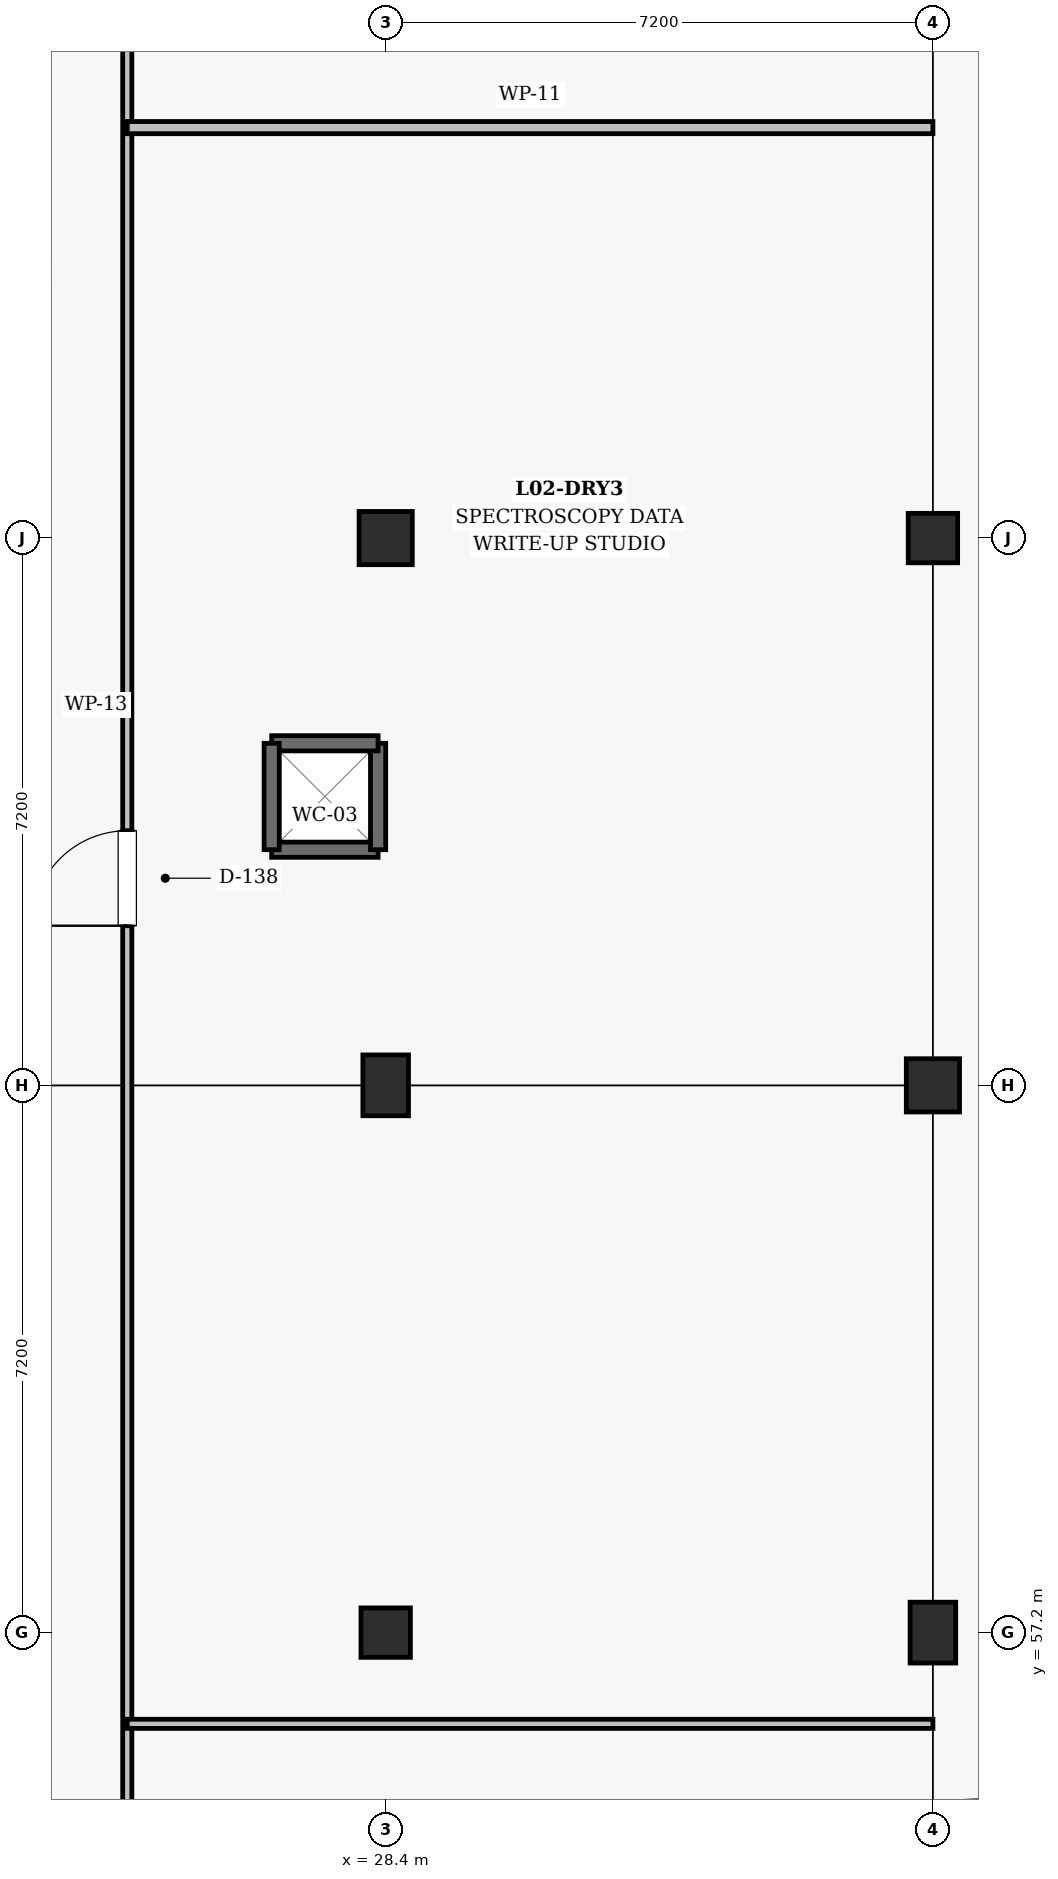
"""IFC4 building model, lengths in metres.
Left out: names, types, materials, properties, quantities, classifications, styles, units other than length and angle.
Written with IfcOpenShell. Run it as: python <this file> out.ifc"""

import sys

from ifc_helpers import new_model, si_unit, direction, frame, frame_2d, origin, origin_2d, place, context, subcontext, project, spatial, rectangle, extrude, element, fill, save


model = new_model("IFC4")
c1 = context("Model", 3, precision=1e-05, world=origin(), true_north=direction((0.0, 1.0)))
c2 = subcontext(c1, "Body", "Model", "MODEL_VIEW")
j1 = project(units=[si_unit("LENGTHUNIT", "METRE"), si_unit("PLANEANGLEUNIT", "RADIAN")], contexts=[c1])
p1 = place(None, origin())
s1 = spatial("IfcSite", under=j1, at=p1, CompositionType="ELEMENT")
p2 = place(p1, origin())
s2 = spatial("IfcBuilding", under=s1, at=p2, CompositionType="ELEMENT")
p3 = place(p2, frame((0.0, 0.0, 9.9)))
s3 = spatial("IfcBuildingStorey", under=s2, at=p3, CompositionType="ELEMENT", Elevation=9.9)
p4 = place(p3, frame((28.4, 57.2, 0.0), z_axis=(0.0, 0.0, 1.0), x_axis=(1.0, 0.0, 0.0)))
e1 = element("IfcColumn", 1, at=p4, inside=s3, PredefinedType="COLUMN", context=c2, shape_type="SweptSolid", body=[
    extrude(rectangle(XDim=0.65, YDim=0.65, at=origin_2d()), origin(), (0.0, 0.0, 1.0), 4.5),
])
p5 = place(p3, frame((28.4, 64.4, 0.0), z_axis=(0.0, 0.0, 1.0), x_axis=(1.0, 0.0, 0.0)))
e2 = element("IfcColumn", 2, at=p5, inside=s3, PredefinedType="COLUMN", context=c2, shape_type="SweptSolid", body=[
    extrude(rectangle(XDim=0.6, YDim=0.8, at=origin_2d()), origin(), (0.0, 0.0, 1.0), 4.5),
])
p6 = place(p3, frame((28.4, 71.6, 0.0), z_axis=(0.0, 0.0, 1.0), x_axis=(1.0, 0.0, 0.0)))
e3 = element("IfcColumn", 3, at=p6, inside=s3, PredefinedType="COLUMN", context=c2, shape_type="SweptSolid", body=[
    extrude(rectangle(XDim=0.7, YDim=0.7, at=origin_2d()), origin(), (0.0, 0.0, 1.0), 4.5),
])
p7 = place(p3, frame((35.6, 57.2, 0.0), z_axis=(0.0, 0.0, 1.0), x_axis=(1.0, 0.0, 0.0)))
e4 = element("IfcColumn", 4, at=p7, inside=s3, PredefinedType="COLUMN", context=c2, shape_type="SweptSolid", body=[
    extrude(rectangle(XDim=0.6, YDim=0.8, at=origin_2d()), origin(), (0.0, 0.0, 1.0), 4.5),
])
p8 = place(p3, frame((35.6, 64.4, 0.0), z_axis=(0.0, 0.0, 1.0), x_axis=(1.0, 0.0, 0.0)))
e5 = element("IfcColumn", 5, at=p8, inside=s3, PredefinedType="COLUMN", context=c2, shape_type="SweptSolid", body=[
    extrude(rectangle(XDim=0.7, YDim=0.7, at=origin_2d()), origin(), (0.0, 0.0, 1.0), 4.5),
])
p9 = place(p3, frame((35.6, 71.6, 0.0), z_axis=(0.0, 0.0, 1.0), x_axis=(1.0, 0.0, 0.0)))
e6 = element("IfcColumn", 6, at=p9, inside=s3, PredefinedType="COLUMN", context=c2, shape_type="SweptSolid", body=[
    extrude(rectangle(XDim=0.65, YDim=0.65, at=origin_2d()), origin(), (0.0, 0.0, 1.0), 4.5),
])
p10 = place(p3, frame((26.9, 67.5, 0.0), z_axis=(0.0, 0.0, 1.0), x_axis=(1.0, 0.0, 0.0)))
e7 = element("IfcWall", 7, at=p10, inside=s3, PredefinedType="SHEAR", context=c2, shape_type="SweptSolid", body=[
    extrude(rectangle(XDim=1.4, YDim=0.2, at=frame_2d((0.7, 0.0))), origin(), (0.0, 0.0, 1.0), 4.16),
])
p11 = place(p3, frame((28.3, 67.5, 0.0), z_axis=(0.0, 0.0, 1.0), x_axis=(0.0, 1.0, 0.0)))
e8 = element("IfcWall", 8, at=p11, inside=s3, PredefinedType="SHEAR", context=c2, shape_type="SweptSolid", body=[
    extrude(rectangle(XDim=1.4, YDim=0.2, at=frame_2d((0.7, 0.0))), origin(), (0.0, 0.0, 1.0), 4.16),
])
p12 = place(p3, frame((28.3, 68.9, 0.0), z_axis=(0.0, 0.0, 1.0), x_axis=(-1.0, 0.0, 0.0)))
e9 = element("IfcWall", 9, at=p12, inside=s3, PredefinedType="SHEAR", context=c2, shape_type="SweptSolid", body=[
    extrude(rectangle(XDim=1.4, YDim=0.2, at=frame_2d((0.7, 0.0))), origin(), (0.0, 0.0, 1.0), 4.16),
])
p13 = place(p3, frame((26.9, 68.9, 0.0), z_axis=(0.0, 0.0, 1.0), x_axis=(0.0, -1.0, 0.0)))
e10 = element("IfcWall", 10, at=p13, inside=s3, PredefinedType="SHEAR", context=c2, shape_type="SweptSolid", body=[
    extrude(rectangle(XDim=1.4, YDim=0.2, at=frame_2d((0.7, 0.0))), origin(), (0.0, 0.0, 1.0), 4.16),
])
p14 = place(p3, frame((25.0, 36.0, 0.0), z_axis=(0.0, 0.0, 1.0), x_axis=(0.0, 1.0, 0.0)))
e11 = element("IfcWall", 11, at=p14, inside=s3, PredefinedType="PARTITIONING", context=c2, shape_type="SweptSolid", body=[
    extrude(rectangle(XDim=66.8, YDim=0.12, at=frame_2d((33.4, 0.0))), origin(), (0.0, 0.0, 1.0), 3.38),
])
p15 = place(p14, frame((10.0, 0.0, 0.0)))
e12 = element("IfcOpeningElement", 12, at=p15, cuts=e11, PredefinedType="OPENING", context=c2, shape_type="SweptSolid", body=[
    extrude(rectangle(XDim=1.18, YDim=2.2, at=frame_2d((0.59, 1.1))), frame((0.0, 0.07, 0.0), z_axis=(0.0, -1.0, 0.0), x_axis=(1.0, 0.0, 0.0)), (0.0, 0.0, 1.0), 0.14),
])
p16 = place(p14, frame((30.5, 0.0, 0.0)))
e13 = element("IfcOpeningElement", 13, at=p16, cuts=e11, PredefinedType="OPENING", context=c2, shape_type="SweptSolid", body=[
    extrude(rectangle(XDim=1.25, YDim=2.2, at=frame_2d((0.625, 1.1))), frame((0.0, 0.07, 0.0), z_axis=(0.0, -1.0, 0.0), x_axis=(1.0, 0.0, 0.0)), (0.0, 0.0, 1.0), 0.14),
])
p17 = place(p14, frame((53.7, 0.0, 0.0)))
e14 = element("IfcOpeningElement", 14, at=p17, cuts=e11, PredefinedType="OPENING", context=c2, shape_type="SweptSolid", body=[
    extrude(rectangle(XDim=1.35, YDim=2.2, at=frame_2d((0.675, 1.1))), frame((0.0, 0.07, 0.0), z_axis=(0.0, -1.0, 0.0), x_axis=(1.0, 0.0, 0.0)), (0.0, 0.0, 1.0), 0.14),
])
p18 = place(p3, frame((25.0, 56.0, 0.0), z_axis=(0.0, 0.0, 1.0), x_axis=(1.0, 0.0, 0.0)))
e15 = element("IfcWall", 15, at=p18, inside=s3, PredefinedType="PARTITIONING", context=c2, shape_type="SweptSolid", body=[
    extrude(rectangle(XDim=10.6, YDim=0.12, at=frame_2d((5.3, 0.0))), origin(), (0.0, 0.0, 1.0), 3.48),
])
p19 = place(p3, frame((25.0, 77.0, 0.0), z_axis=(0.0, 0.0, 1.0), x_axis=(1.0, 0.0, 0.0)))
e16 = element("IfcWall", 16, at=p19, inside=s3, PredefinedType="PARTITIONING", context=c2, shape_type="SweptSolid", body=[
    extrude(rectangle(XDim=10.6, YDim=0.16, at=frame_2d((5.3, 0.0))), origin(), (0.0, 0.0, 1.0), 3.58),
])
p20 = place(p16, origin())
e17 = element("IfcDoor", 17, at=p20, inside=s3, OperationType="SINGLE_SWING_LEFT", PredefinedType="DOOR", context=c2, shape_type="SweptSolid", body=[
    extrude(rectangle(XDim=1.25, YDim=2.2, at=frame_2d((0.625, 1.1))), frame((0.0, 0.025, 0.0), z_axis=(0.0, -1.0, 0.0), x_axis=(1.0, 0.0, 0.0)), (0.0, 0.0, 1.0), 0.05),
])
fill(e13, e17)
save(model, sys.argv[1])
